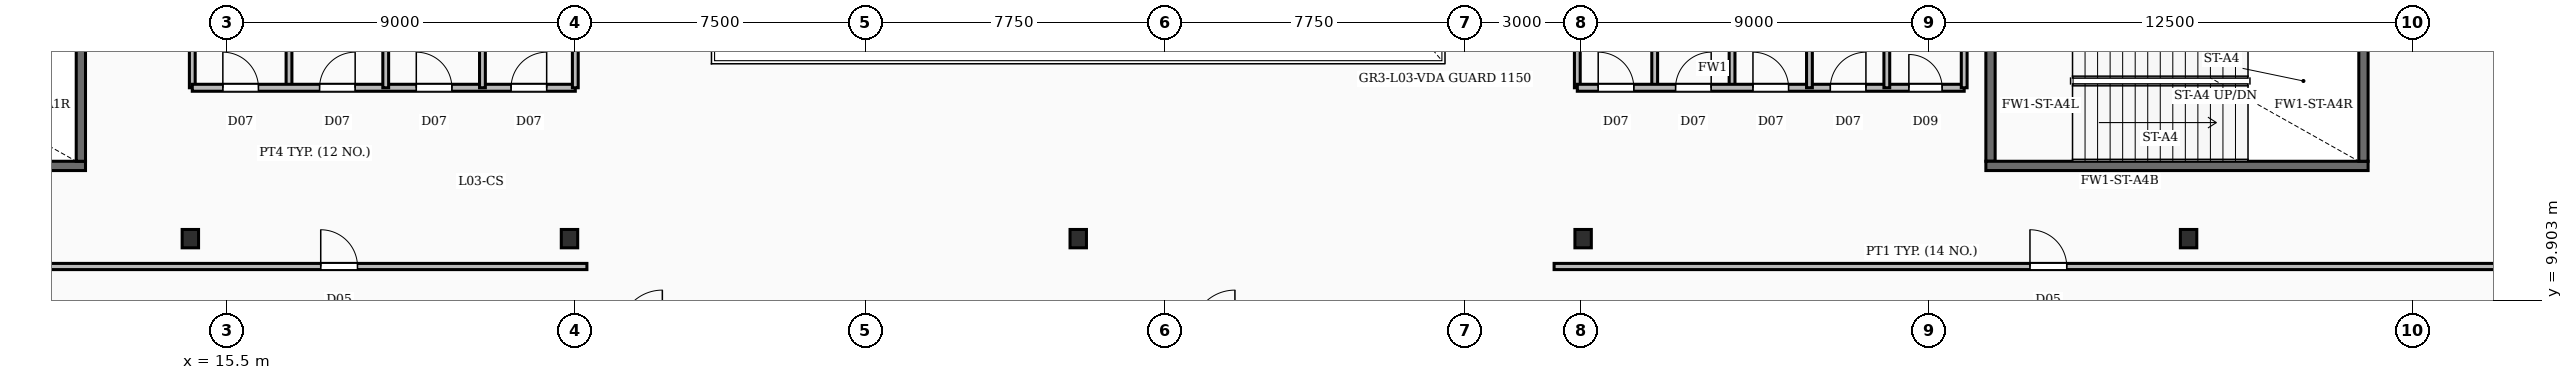
"""IFC4 building model, lengths in metres.
Left out: names, types, materials, properties, quantities, classifications, styles, units other than length and angle.
Written with IfcOpenShell. Run it as: python <this file> out.ifc"""

import sys

from ifc_helpers import new_model, si_unit, direction, frame, frame_2d, origin, origin_2d, place, context, subcontext, project, spatial, rectangle, i_section, extrude, element, fill, save


model = new_model("IFC4")
c1 = context("Model", 3, precision=1e-05, world=origin(), true_north=direction((0.0, 1.0)))
c2 = subcontext(c1, "Body", "Model", "MODEL_VIEW")
j1 = project(units=[si_unit("LENGTHUNIT", "METRE"), si_unit("PLANEANGLEUNIT", "RADIAN")], contexts=[c1])
p1 = place(None, origin())
s1 = spatial("IfcSite", under=j1, at=p1, CompositionType="ELEMENT")
p2 = place(p1, origin())
s2 = spatial("IfcBuilding", under=s1, at=p2, CompositionType="ELEMENT")
p3 = place(p2, frame((0.0, 0.0, 18.0)))
s3 = spatial("IfcBuildingStorey", under=s2, at=p3, CompositionType="ELEMENT", Elevation=18.0)
for number, where, z_axis, x_axis in (
    (1, (14.55, 11.5, -0.35), (0.0, 0.0, 1.0), (1.0, 0.0, 0.0)),
    (2, (24.35, 11.5, -0.35), (0.0, 0.0, 1.0), (1.0, 0.0, 0.0)),
    (3, (37.5, 11.5, -0.35), (0.0, 0.0, 1.0), (1.0, 0.0, 0.0)),
    (4, (50.55, 11.5, -0.35), (0.0, 0.0, 1.0), (1.0, 0.0, 0.0)),
    (5, (66.2, 11.5, -0.35), (0.0, 0.0, 1.0), (1.0, 0.0, 0.0)),
):
    element("IfcColumn", number, at=place(p3, frame(where, z_axis=z_axis, x_axis=x_axis)), inside=s3, PredefinedType="COLUMN", context=c2, shape_type="SweptSolid", body=[
        extrude(i_section(OverallWidth=0.424, OverallDepth=0.474, WebThickness=0.048, FlangeThickness=0.077, FilletRadius=0.02, at=origin_2d()), origin(), (0.0, 0.0, 1.0), 5.0),
    ])
p4 = place(p3, frame((1.96, 13.38, 0.0), z_axis=(0.0, 0.0, 1.0), x_axis=(1.0, 0.0, 0.0)))
e6 = element("IfcWall", 6, at=p4, inside=s3, PredefinedType="SOLIDWALL", context=c2, shape_type="SweptSolid", body=[
    extrude(rectangle(XDim=9.88, YDim=0.24, at=frame_2d((4.94, 0.0))), origin(), (0.0, 0.0, 1.0), 4.65),
])
p5 = place(p3, frame((11.72, 13.5, 0.0), z_axis=(0.0, 0.0, 1.0), x_axis=(0.0, 1.0, 0.0)))
e7 = element("IfcWall", 7, at=p5, inside=s3, PredefinedType="SOLIDWALL", context=c2, shape_type="SweptSolid", body=[
    extrude(rectangle(XDim=4.15, YDim=0.24, at=frame_2d((2.075, 0.0))), origin(), (0.0, 0.0, 1.0), 4.65),
])
p6 = place(p3, frame((60.96, 13.38, 0.0), z_axis=(0.0, 0.0, 1.0), x_axis=(1.0, 0.0, 0.0)))
e8 = element("IfcWall", 8, at=p6, inside=s3, PredefinedType="SOLIDWALL", context=c2, shape_type="SweptSolid", body=[
    extrude(rectangle(XDim=9.88, YDim=0.24, at=frame_2d((4.94, 0.0))), origin(), (0.0, 0.0, 1.0), 4.65),
])
for number, where, z_axis, x_axis in (
    (9, (61.08, 13.5, 0.0), (0.0, 0.0, 1.0), (0.0, 1.0, 0.0)),
    (10, (70.72, 13.5, 0.0), (0.0, 0.0, 1.0), (0.0, 1.0, 0.0)),
):
    element("IfcWall", number, at=place(p3, frame(where, z_axis=z_axis, x_axis=x_axis)), inside=s3, PredefinedType="SOLIDWALL", context=c2, shape_type="SweptSolid", body=[
        extrude(rectangle(XDim=4.15, YDim=0.24, at=frame_2d((2.075, 0.0))), origin(), (0.0, 0.0, 1.0), 4.65),
    ])
for number, where, z_axis, x_axis in (
    (11, (17.1, 15.4, 0.0), (0.0, 0.0, 1.0), (0.0, 1.0, 0.0)),
    (12, (19.6, 15.4, 0.0), (0.0, 0.0, 1.0), (0.0, 1.0, 0.0)),
    (13, (22.1, 15.4, 0.0), (0.0, 0.0, 1.0), (0.0, 1.0, 0.0)),
):
    element("IfcWall", number, at=place(p3, frame(where, z_axis=z_axis, x_axis=x_axis)), inside=s3, PredefinedType="PARTITIONING", context=c2, shape_type="SweptSolid", body=[
        extrude(rectangle(XDim=3.58, YDim=0.15, at=frame_2d((1.79, 0.0))), origin(), (0.0, 0.0, 1.0), 3.71),
    ])
p7 = place(p3, frame((14.6, 15.4, 0.0), z_axis=(0.0, 0.0, 1.0), x_axis=(1.0, 0.0, 0.0)))
e14 = element("IfcWall", 14, at=p7, inside=s3, PredefinedType="PARTITIONING", context=c2, shape_type="SweptSolid", body=[
    extrude(rectangle(XDim=9.9, YDim=0.18, at=frame_2d((4.95, 0.0))), origin(), (0.0, 0.0, 1.0), 3.71),
])
p8 = place(p7, frame((0.79, 0.0, 0.0)))
e15 = element("IfcOpeningElement", 15, at=p8, cuts=e14, PredefinedType="OPENING", context=c2, shape_type="SweptSolid", body=[
    extrude(rectangle(XDim=0.92, YDim=2.1, at=frame_2d((0.46, 1.05))), frame((0.0, 0.1, 0.0), z_axis=(0.0, -1.0, 0.0), x_axis=(1.0, 0.0, 0.0)), (0.0, 0.0, 1.0), 0.2),
])
p9 = place(p7, frame((3.29, 0.0, 0.0)))
e16 = element("IfcOpeningElement", 16, at=p9, cuts=e14, PredefinedType="OPENING", context=c2, shape_type="SweptSolid", body=[
    extrude(rectangle(XDim=0.92, YDim=2.1, at=frame_2d((0.46, 1.05))), frame((0.0, 0.1, 0.0), z_axis=(0.0, -1.0, 0.0), x_axis=(1.0, 0.0, 0.0)), (0.0, 0.0, 1.0), 0.2),
])
p10 = place(p7, frame((5.79, 0.0, 0.0)))
e17 = element("IfcOpeningElement", 17, at=p10, cuts=e14, PredefinedType="OPENING", context=c2, shape_type="SweptSolid", body=[
    extrude(rectangle(XDim=0.92, YDim=2.1, at=frame_2d((0.46, 1.05))), frame((0.0, 0.1, 0.0), z_axis=(0.0, -1.0, 0.0), x_axis=(1.0, 0.0, 0.0)), (0.0, 0.0, 1.0), 0.2),
])
p11 = place(p7, frame((8.24, 0.0, 0.0)))
e18 = element("IfcOpeningElement", 18, at=p11, cuts=e14, PredefinedType="OPENING", context=c2, shape_type="SweptSolid", body=[
    extrude(rectangle(XDim=0.92, YDim=2.1, at=frame_2d((0.46, 1.05))), frame((0.0, 0.1, 0.0), z_axis=(0.0, -1.0, 0.0), x_axis=(1.0, 0.0, 0.0)), (0.0, 0.0, 1.0), 0.2),
])
for number, where, z_axis, x_axis in (
    (19, (14.6, 15.4, 0.0), (0.0, 0.0, 1.0), (0.0, 1.0, 0.0)),
    (20, (24.5, 15.4, 0.0), (0.0, 0.0, 1.0), (0.0, 1.0, 0.0)),
    (21, (52.4, 15.4, 0.0), (0.0, 0.0, 1.0), (0.0, 1.0, 0.0)),
    (22, (54.4, 15.4, 0.0), (0.0, 0.0, 1.0), (0.0, 1.0, 0.0)),
    (23, (56.4, 15.4, 0.0), (0.0, 0.0, 1.0), (0.0, 1.0, 0.0)),
    (24, (58.4, 15.4, 0.0), (0.0, 0.0, 1.0), (0.0, 1.0, 0.0)),
):
    element("IfcWall", number, at=place(p3, frame(where, z_axis=z_axis, x_axis=x_axis)), inside=s3, PredefinedType="PARTITIONING", context=c2, shape_type="SweptSolid", body=[
        extrude(rectangle(XDim=3.58, YDim=0.15, at=frame_2d((1.79, 0.0))), origin(), (0.0, 0.0, 1.0), 3.71),
    ])
p12 = place(p3, frame((50.4, 15.4, 0.0), z_axis=(0.0, 0.0, 1.0), x_axis=(1.0, 0.0, 0.0)))
e25 = element("IfcWall", 25, at=p12, inside=s3, PredefinedType="SOLIDWALL", context=c2, shape_type="SweptSolid", body=[
    extrude(rectangle(XDim=10.0, YDim=0.18, at=frame_2d((5.0, 0.0))), origin(), (0.0, 0.0, 1.0), 3.71),
])
p13 = place(p12, frame((0.54, 0.0, 0.0)))
e26 = element("IfcOpeningElement", 26, at=p13, cuts=e25, PredefinedType="OPENING", context=c2, shape_type="SweptSolid", body=[
    extrude(rectangle(XDim=0.92, YDim=2.1, at=frame_2d((0.46, 1.05))), frame((0.0, 0.1, 0.0), z_axis=(0.0, -1.0, 0.0), x_axis=(1.0, 0.0, 0.0)), (0.0, 0.0, 1.0), 0.2),
])
p14 = place(p12, frame((2.54, 0.0, 0.0)))
e27 = element("IfcOpeningElement", 27, at=p14, cuts=e25, PredefinedType="OPENING", context=c2, shape_type="SweptSolid", body=[
    extrude(rectangle(XDim=0.92, YDim=2.1, at=frame_2d((0.46, 1.05))), frame((0.0, 0.1, 0.0), z_axis=(0.0, -1.0, 0.0), x_axis=(1.0, 0.0, 0.0)), (0.0, 0.0, 1.0), 0.2),
])
p15 = place(p12, frame((4.54, 0.0, 0.0)))
e28 = element("IfcOpeningElement", 28, at=p15, cuts=e25, PredefinedType="OPENING", context=c2, shape_type="SweptSolid", body=[
    extrude(rectangle(XDim=0.92, YDim=2.1, at=frame_2d((0.46, 1.05))), frame((0.0, 0.1, 0.0), z_axis=(0.0, -1.0, 0.0), x_axis=(1.0, 0.0, 0.0)), (0.0, 0.0, 1.0), 0.2),
])
p16 = place(p12, frame((6.54, 0.0, 0.0)))
e29 = element("IfcOpeningElement", 29, at=p16, cuts=e25, PredefinedType="OPENING", context=c2, shape_type="SweptSolid", body=[
    extrude(rectangle(XDim=0.92, YDim=2.1, at=frame_2d((0.46, 1.05))), frame((0.0, 0.1, 0.0), z_axis=(0.0, -1.0, 0.0), x_axis=(1.0, 0.0, 0.0)), (0.0, 0.0, 1.0), 0.2),
])
p17 = place(p12, frame((8.57, 0.0, 0.0)))
e30 = element("IfcOpeningElement", 30, at=p17, cuts=e25, PredefinedType="OPENING", context=c2, shape_type="SweptSolid", body=[
    extrude(rectangle(XDim=0.86, YDim=2.05, at=frame_2d((0.43, 1.025))), frame((0.0, 0.1, 0.0), z_axis=(0.0, -1.0, 0.0), x_axis=(1.0, 0.0, 0.0)), (0.0, 0.0, 1.0), 0.2),
])
for number, where, z_axis, x_axis in (
    (31, (50.4, 15.4, 0.0), (0.0, 0.0, 1.0), (0.0, 1.0, 0.0)),
    (32, (60.4, 15.4, 0.0), (0.0, 0.0, 1.0), (0.0, 1.0, 0.0)),
):
    element("IfcWall", number, at=place(p3, frame(where, z_axis=z_axis, x_axis=x_axis)), inside=s3, PredefinedType="PARTITIONING", context=c2, shape_type="SweptSolid", body=[
        extrude(rectangle(XDim=3.58, YDim=0.15, at=frame_2d((1.79, 0.0))), origin(), (0.0, 0.0, 1.0), 3.71),
    ])
p18 = place(p3, frame((0.0, 10.78, 0.0), z_axis=(0.0, 0.0, 1.0), x_axis=(1.0, 0.0, 0.0)))
e33 = element("IfcWall", 33, at=p18, inside=s3, PredefinedType="PARTITIONING", context=c2, shape_type="SweptSolid", body=[
    extrude(rectangle(XDim=24.8, YDim=0.16, at=frame_2d((12.4, 0.0))), origin(), (0.0, 0.0, 1.0), 3.71),
])
p19 = place(p18, frame((17.92, 0.0, 0.0)))
e34 = element("IfcOpeningElement", 34, at=p19, cuts=e33, PredefinedType="OPENING", context=c2, shape_type="SweptSolid", body=[
    extrude(rectangle(XDim=0.95, YDim=2.15, at=frame_2d((0.475, 1.075))), frame((0.0, 0.09, 0.0), z_axis=(0.0, -1.0, 0.0), x_axis=(1.0, 0.0, 0.0)), (0.0, 0.0, 1.0), 0.18),
])
p20 = place(p3, frame((49.8, 10.78, 0.0), z_axis=(0.0, 0.0, 1.0), x_axis=(1.0, 0.0, 0.0)))
e35 = element("IfcWall", 35, at=p20, inside=s3, PredefinedType="PARTITIONING", context=c2, shape_type="SweptSolid", body=[
    extrude(rectangle(XDim=29.7, YDim=0.16, at=frame_2d((14.85, 0.0))), origin(), (0.0, 0.0, 1.0), 3.71),
])
p21 = place(p20, frame((12.3, 0.0, 0.0)))
e36 = element("IfcOpeningElement", 36, at=p21, cuts=e35, PredefinedType="OPENING", context=c2, shape_type="SweptSolid", body=[
    extrude(rectangle(XDim=0.95, YDim=2.15, at=frame_2d((0.475, 1.075))), frame((0.0, 0.09, 0.0), z_axis=(0.0, -1.0, 0.0), x_axis=(1.0, 0.0, 0.0)), (0.0, 0.0, 1.0), 0.18),
])
p22 = place(p8, origin())
e37 = element("IfcDoor", 37, at=p22, inside=s3, OperationType="SINGLE_SWING_LEFT", PredefinedType="DOOR", context=c2, shape_type="SweptSolid", body=[
    extrude(rectangle(XDim=0.92, YDim=2.1, at=frame_2d((0.46, 1.05))), frame((0.0, 0.025, 0.0), z_axis=(0.0, -1.0, 0.0), x_axis=(1.0, 0.0, 0.0)), (0.0, 0.0, 1.0), 0.05),
])
fill(e15, e37)
p23 = place(p9, origin())
e38 = element("IfcDoor", 38, at=p23, inside=s3, OperationType="SINGLE_SWING_RIGHT", PredefinedType="DOOR", context=c2, shape_type="SweptSolid", body=[
    extrude(rectangle(XDim=0.92, YDim=2.1, at=frame_2d((0.46, 1.05))), frame((0.0, 0.025, 0.0), z_axis=(0.0, -1.0, 0.0), x_axis=(1.0, 0.0, 0.0)), (0.0, 0.0, 1.0), 0.05),
])
fill(e16, e38)
p24 = place(p10, origin())
e39 = element("IfcDoor", 39, at=p24, inside=s3, OperationType="SINGLE_SWING_LEFT", PredefinedType="DOOR", context=c2, shape_type="SweptSolid", body=[
    extrude(rectangle(XDim=0.92, YDim=2.1, at=frame_2d((0.46, 1.05))), frame((0.0, 0.025, 0.0), z_axis=(0.0, -1.0, 0.0), x_axis=(1.0, 0.0, 0.0)), (0.0, 0.0, 1.0), 0.05),
])
fill(e17, e39)
p25 = place(p11, origin())
e40 = element("IfcDoor", 40, at=p25, inside=s3, OperationType="SINGLE_SWING_RIGHT", PredefinedType="DOOR", context=c2, shape_type="SweptSolid", body=[
    extrude(rectangle(XDim=0.92, YDim=2.1, at=frame_2d((0.46, 1.05))), frame((0.0, 0.025, 0.0), z_axis=(0.0, -1.0, 0.0), x_axis=(1.0, 0.0, 0.0)), (0.0, 0.0, 1.0), 0.05),
])
fill(e18, e40)
p26 = place(p13, origin())
e41 = element("IfcDoor", 41, at=p26, inside=s3, OperationType="SINGLE_SWING_LEFT", PredefinedType="DOOR", context=c2, shape_type="SweptSolid", body=[
    extrude(rectangle(XDim=0.92, YDim=2.1, at=frame_2d((0.46, 1.05))), frame((0.0, 0.025, 0.0), z_axis=(0.0, -1.0, 0.0), x_axis=(1.0, 0.0, 0.0)), (0.0, 0.0, 1.0), 0.05),
])
fill(e26, e41)
p27 = place(p14, origin())
e42 = element("IfcDoor", 42, at=p27, inside=s3, OperationType="SINGLE_SWING_RIGHT", PredefinedType="DOOR", context=c2, shape_type="SweptSolid", body=[
    extrude(rectangle(XDim=0.92, YDim=2.1, at=frame_2d((0.46, 1.05))), frame((0.0, 0.025, 0.0), z_axis=(0.0, -1.0, 0.0), x_axis=(1.0, 0.0, 0.0)), (0.0, 0.0, 1.0), 0.05),
])
fill(e27, e42)
p28 = place(p15, origin())
e43 = element("IfcDoor", 43, at=p28, inside=s3, OperationType="SINGLE_SWING_LEFT", PredefinedType="DOOR", context=c2, shape_type="SweptSolid", body=[
    extrude(rectangle(XDim=0.92, YDim=2.1, at=frame_2d((0.46, 1.05))), frame((0.0, 0.025, 0.0), z_axis=(0.0, -1.0, 0.0), x_axis=(1.0, 0.0, 0.0)), (0.0, 0.0, 1.0), 0.05),
])
fill(e28, e43)
p29 = place(p16, origin())
e44 = element("IfcDoor", 44, at=p29, inside=s3, OperationType="SINGLE_SWING_RIGHT", PredefinedType="DOOR", context=c2, shape_type="SweptSolid", body=[
    extrude(rectangle(XDim=0.92, YDim=2.1, at=frame_2d((0.46, 1.05))), frame((0.0, 0.025, 0.0), z_axis=(0.0, -1.0, 0.0), x_axis=(1.0, 0.0, 0.0)), (0.0, 0.0, 1.0), 0.05),
])
fill(e29, e44)
p30 = place(p17, origin())
e45 = element("IfcDoor", 45, at=p30, inside=s3, OperationType="SINGLE_SWING_LEFT", PredefinedType="DOOR", context=c2, shape_type="SweptSolid", body=[
    extrude(rectangle(XDim=0.86, YDim=2.05, at=frame_2d((0.43, 1.025))), frame((0.0, 0.025, 0.0), z_axis=(0.0, -1.0, 0.0), x_axis=(1.0, 0.0, 0.0)), (0.0, 0.0, 1.0), 0.05),
])
fill(e30, e45)
p31 = place(p19, origin())
e46 = element("IfcDoor", 46, at=p31, inside=s3, OperationType="SINGLE_SWING_LEFT", PredefinedType="DOOR", context=c2, shape_type="SweptSolid", body=[
    extrude(rectangle(XDim=0.95, YDim=2.15, at=frame_2d((0.475, 1.075))), frame((0.0, 0.025, 0.0), z_axis=(0.0, -1.0, 0.0), x_axis=(1.0, 0.0, 0.0)), (0.0, 0.0, 1.0), 0.05),
])
fill(e34, e46)
p32 = place(p21, origin())
e47 = element("IfcDoor", 47, at=p32, inside=s3, OperationType="SINGLE_SWING_LEFT", PredefinedType="DOOR", context=c2, shape_type="SweptSolid", body=[
    extrude(rectangle(XDim=0.95, YDim=2.15, at=frame_2d((0.475, 1.075))), frame((0.0, 0.025, 0.0), z_axis=(0.0, -1.0, 0.0), x_axis=(1.0, 0.0, 0.0)), (0.0, 0.0, 1.0), 0.05),
])
fill(e36, e47)
save(model, sys.argv[1])
